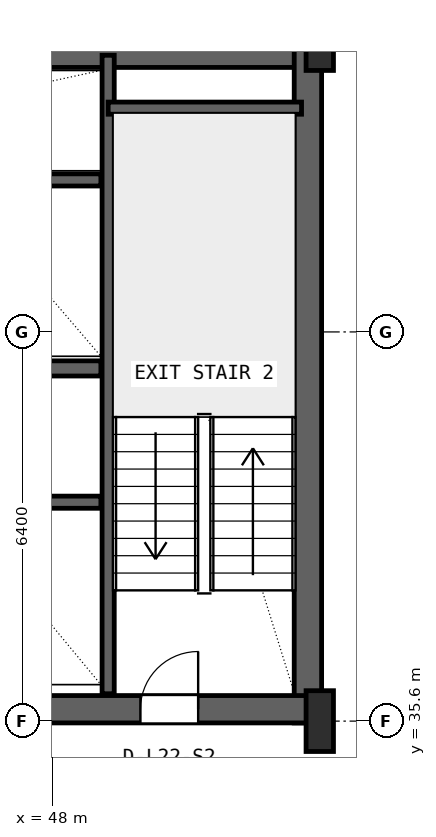
"""IFC4 building model, lengths in metres.
Left out: names, types, materials, properties, quantities, classifications, styles, units other than length and angle.
Written with IfcOpenShell. Run it as: python <this file> out.ifc"""

import sys

from ifc_helpers import new_model, si_unit, direction, frame, frame_2d, origin, origin_2d, place, context, subcontext, project, spatial, rectangle, i_section, extrude, source, transform, mapped, element, fill, save


model = new_model("IFC4")
c1 = context("Model", 3, precision=1e-05, world=origin(), true_north=direction((0.0, 1.0)))
c2 = subcontext(c1, "Body", "Model", "MODEL_VIEW")
j1 = project(units=[si_unit("LENGTHUNIT", "METRE"), si_unit("PLANEANGLEUNIT", "RADIAN")], contexts=[c1])
p1 = place(None, origin())
s1 = spatial("IfcSite", under=j1, at=p1, CompositionType="ELEMENT")
p2 = place(p1, origin())
s2 = spatial("IfcBuilding", under=s1, at=p2, CompositionType="ELEMENT")
p3 = place(p2, frame((0.0, 0.0, 94.6)))
s3 = spatial("IfcBuildingStorey", under=s2, at=p3, CompositionType="ELEMENT", Elevation=94.6)
p4 = place(p3, frame((15.6, 46.575, 0.0), z_axis=(0.0, 0.0, 1.0), x_axis=(1.0, 0.0, 0.0)))
e1 = element("IfcWall", 1, at=p4, inside=s3, PredefinedType="SHEAR", context=c2, shape_type="SweptSolid", body=[
    extrude(rectangle(XDim=36.8, YDim=0.45, at=frame_2d((18.4, 0.0))), origin(), (0.0, 0.0, 1.0), 3.52),
])
p5 = place(p3, frame((52.205, 35.57, 0.0), z_axis=(0.0, 0.0, 1.0), x_axis=(0.0, 1.0, 0.0)))
e2 = element("IfcWall", 2, at=p5, inside=s3, PredefinedType="SHEAR", context=c2, shape_type="SweptSolid", body=[
    extrude(rectangle(XDim=11.23, YDim=0.45, at=frame_2d((5.615, 0.0))), origin(), (0.0, 0.0, 1.0), 3.52),
])
p6 = place(p3, frame((43.2, 35.795, 0.0), z_axis=(0.0, 0.0, 1.0), x_axis=(1.0, 0.0, 0.0)))
e3 = element("IfcWall", 3, at=p6, inside=s3, PredefinedType="SHEAR", context=c2, shape_type="SweptSolid", body=[
    extrude(rectangle(XDim=9.23, YDim=0.45, at=frame_2d((4.615, 0.0))), origin(), (0.0, 0.0, 1.0), 3.52),
])
p7 = place(p6, frame((6.25, 0.0, 0.0)))
e4 = element("IfcOpeningElement", 4, at=p7, cuts=e3, PredefinedType="OPENING", context=c2, shape_type="SweptSolid", body=[
    extrude(rectangle(XDim=0.95, YDim=2.1, at=frame_2d((0.475, 1.05))), frame((0.0, 0.235, 0.0), z_axis=(0.0, -1.0, 0.0), x_axis=(1.0, 0.0, 0.0)), (0.0, 0.0, 1.0), 0.47),
])
m1 = source(origin(), c2, "Body", "SweptSolid", [
    extrude(i_section(OverallWidth=0.45, OverallDepth=1.0, WebThickness=0.016, FlangeThickness=0.03, FilletRadius=0.016, at=origin_2d()), origin(), (0.0, 0.0, 1.0), 3.8),
])
for number, where, z_axis, x_axis in (
    (5, (52.4, 35.6, 0.0), (0.0, 0.0, 1.0), (1.0, 0.0, 0.0)),
    (6, (52.4, 46.8, 0.0), (0.0, 0.0, 1.0), (1.0, 0.0, 0.0)),
):
    element("IfcColumn", number, at=place(p3, frame(where, z_axis=z_axis, x_axis=x_axis)), inside=s3, PredefinedType="COLUMN", context=c2, shape_type="MappedRepresentation", body=[
        mapped(m1, transform((0.0, 0.0, 0.0), x_axis=(1.0, 0.0, 0.0), y_axis=(0.0, 1.0, 0.0), z_axis=(0.0, 0.0, 1.0), scale=1.0)),
    ])
p8 = place(p3, frame((48.92, 36.05, 0.0), z_axis=(0.0, 0.0, 1.0), x_axis=(0.0, 1.0, 0.0)))
e7 = element("IfcWall", 7, at=p8, inside=s3, PredefinedType="SHEAR", context=c2, shape_type="SweptSolid", body=[
    extrude(rectangle(XDim=10.5, YDim=0.2, at=frame_2d((5.25, 0.0))), origin(), (0.0, 0.0, 1.0), 3.52),
])
p9 = place(p3, frame((48.92, 45.68, 0.0), z_axis=(0.0, 0.0, 1.0), x_axis=(1.0, 0.0, 0.0)))
e8 = element("IfcWall", 8, at=p9, inside=s3, PredefinedType="SHEAR", context=c2, shape_type="SweptSolid", body=[
    extrude(rectangle(XDim=3.18, YDim=0.2, at=frame_2d((1.59, 0.0))), origin(), (0.0, 0.0, 1.0), 3.52),
])
p10 = place(p3, frame((24.98, 41.4, 0.0), z_axis=(0.0, 0.0, 1.0), x_axis=(1.0, 0.0, 0.0)))
e9 = element("IfcWall", 9, at=p10, inside=s3, PredefinedType="SHEAR", context=c2, shape_type="SweptSolid", body=[
    extrude(rectangle(XDim=23.82, YDim=0.25, at=frame_2d((11.91, 0.0))), origin(), (0.0, 0.0, 1.0), 3.52),
])
p11 = place(p10, frame((0.87, 0.0, 0.0)))
e10 = element("IfcOpeningElement", 10, at=p11, cuts=e9, PredefinedType="OPENING", context=c2, shape_type="SweptSolid", body=[
    extrude(rectangle(XDim=1.1, YDim=2.18, at=frame_2d((0.55, 1.09))), frame((0.0, 0.135, 0.0), z_axis=(0.0, -1.0, 0.0), x_axis=(1.0, 0.0, 0.0)), (0.0, 0.0, 1.0), 0.27),
])
p12 = place(p10, frame((3.47, 0.0, 0.0)))
e11 = element("IfcOpeningElement", 11, at=p12, cuts=e9, PredefinedType="OPENING", context=c2, shape_type="SweptSolid", body=[
    extrude(rectangle(XDim=1.1, YDim=2.18, at=frame_2d((0.55, 1.09))), frame((0.0, 0.135, 0.0), z_axis=(0.0, -1.0, 0.0), x_axis=(1.0, 0.0, 0.0)), (0.0, 0.0, 1.0), 0.27),
])
p13 = place(p10, frame((6.07, 0.0, 0.0)))
e12 = element("IfcOpeningElement", 12, at=p13, cuts=e9, PredefinedType="OPENING", context=c2, shape_type="SweptSolid", body=[
    extrude(rectangle(XDim=1.1, YDim=2.18, at=frame_2d((0.55, 1.09))), frame((0.0, 0.135, 0.0), z_axis=(0.0, -1.0, 0.0), x_axis=(1.0, 0.0, 0.0)), (0.0, 0.0, 1.0), 0.27),
])
p14 = place(p3, frame((41.22, 44.5, 0.0), z_axis=(0.0, 0.0, 1.0), x_axis=(1.0, 0.0, 0.0)))
e13 = element("IfcWall", 13, at=p14, inside=s3, PredefinedType="SHEAR", context=c2, shape_type="SweptSolid", body=[
    extrude(rectangle(XDim=7.58, YDim=0.2, at=frame_2d((3.79, 0.0))), origin(), (0.0, 0.0, 1.0), 3.52),
])
p15 = place(p3, frame((43.65, 39.2, 0.0), z_axis=(0.0, 0.0, 1.0), x_axis=(1.0, 0.0, 0.0)))
e14 = element("IfcWall", 14, at=p15, inside=s3, PredefinedType="SHEAR", context=c2, shape_type="SweptSolid", body=[
    extrude(rectangle(XDim=5.15, YDim=0.2, at=frame_2d((2.575, 0.0))), origin(), (0.0, 0.0, 1.0), 3.52),
])
m2 = source(origin(), c2, "Body", "SweptSolid", [
    extrude(rectangle(XDim=0.95, YDim=2.1, at=frame_2d((0.475, 1.05))), frame((0.0, 0.025, 0.0), z_axis=(0.0, -1.0, 0.0), x_axis=(1.0, 0.0, 0.0)), (0.0, 0.0, 1.0), 0.05),
])
p16 = place(p7, origin())
e15 = element("IfcDoor", 15, at=p16, inside=s3, OperationType="SINGLE_SWING_RIGHT", PredefinedType="DOOR", context=c2, shape_type="MappedRepresentation", body=[
    mapped(m2, transform((0.0, 0.0, 0.0), x_axis=(1.0, 0.0, 0.0), y_axis=(0.0, 1.0, 0.0), z_axis=(0.0, 0.0, 1.0), scale=1.0)),
])
fill(e4, e15)
save(model, sys.argv[1])
